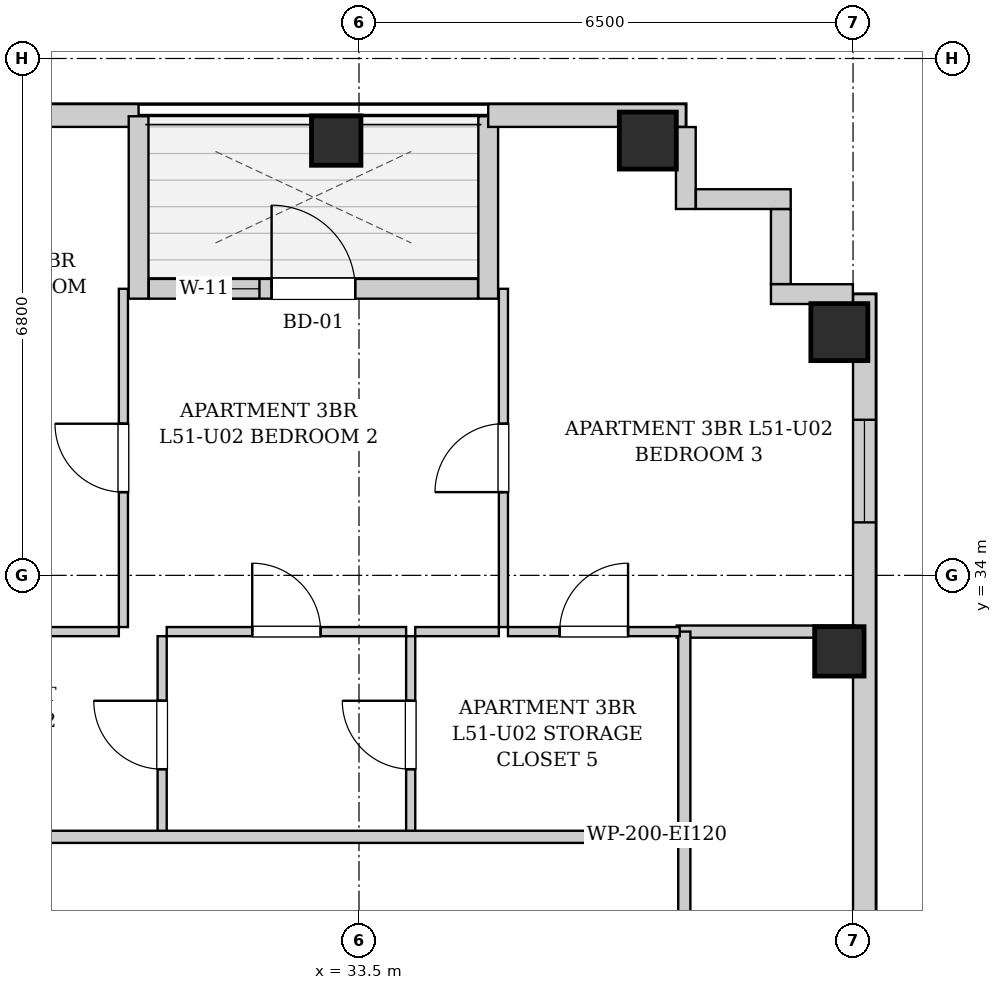
"""IFC4 building model, lengths in metres.
Left out: names, types, materials, properties, quantities, classifications, styles, units other than length and angle.
Written with IfcOpenShell. Run it as: python <this file> out.ifc"""

import sys

from ifc_helpers import new_model, si_unit, direction, frame, frame_2d, origin, origin_2d, place, context, subcontext, project, spatial, rectangle, extrude, element, fill, save


model = new_model("IFC4")
c1 = context("Model", 3, precision=1e-05, world=origin(), true_north=direction((0.0, 1.0)))
c2 = subcontext(c1, "Body", "Model", "MODEL_VIEW")
j1 = project(units=[si_unit("LENGTHUNIT", "METRE"), si_unit("PLANEANGLEUNIT", "RADIAN")], contexts=[c1])
p1 = place(None, origin())
s1 = spatial("IfcSite", under=j1, at=p1, CompositionType="ELEMENT")
p2 = place(p1, origin())
s2 = spatial("IfcBuilding", under=s1, at=p2, CompositionType="ELEMENT")
p3 = place(p2, frame((0.0, 0.0, 177.7)))
s3 = spatial("IfcBuildingStorey", under=s2, at=p3, CompositionType="ELEMENT", Elevation=177.7)
p4 = place(p3, frame((33.2, 39.72, 0.0), z_axis=(0.0, 0.0, 1.0), x_axis=(1.0, 0.0, 0.0)))
e1 = element("IfcColumn", 1, at=p4, inside=s3, PredefinedType="COLUMN", context=c2, shape_type="SweptSolid", body=[
    extrude(rectangle(XDim=0.65, YDim=0.65, at=origin_2d()), origin(), (0.0, 0.0, 1.0), 3.3),
])
p5 = place(p3, frame((37.3, 39.72, 0.0), z_axis=(0.0, 0.0, 1.0), x_axis=(1.0, 0.0, 0.0)))
e2 = element("IfcColumn", 2, at=p5, inside=s3, PredefinedType="COLUMN", context=c2, shape_type="SweptSolid", body=[
    extrude(rectangle(XDim=0.75, YDim=0.75, at=origin_2d()), origin(), (0.0, 0.0, 1.0), 3.3),
])
p6 = place(p3, frame((39.82, 33.0, 0.0), z_axis=(0.0, 0.0, 1.0), x_axis=(1.0, 0.0, 0.0)))
e3 = element("IfcColumn", 3, at=p6, inside=s3, PredefinedType="COLUMN", context=c2, shape_type="SweptSolid", body=[
    extrude(rectangle(XDim=0.65, YDim=0.65, at=origin_2d()), origin(), (0.0, 0.0, 1.0), 3.3),
])
p7 = place(p3, frame((39.82, 37.2, 0.0), z_axis=(0.0, 0.0, 1.0), x_axis=(1.0, 0.0, 0.0)))
e4 = element("IfcColumn", 4, at=p7, inside=s3, PredefinedType="COLUMN", context=c2, shape_type="SweptSolid", body=[
    extrude(rectangle(XDim=0.75, YDim=0.75, at=origin_2d()), origin(), (0.0, 0.0, 1.0), 3.3),
])
p8 = place(p3, frame((13.1, 40.05, 0.0), z_axis=(0.0, 0.0, 1.0), x_axis=(1.0, 0.0, 0.0)))
e5 = element("IfcWall", 5, at=p8, inside=s3, PredefinedType="SOLIDWALL", context=c2, shape_type="SweptSolid", body=[
    extrude(rectangle(XDim=17.5, YDim=0.3, at=frame_2d((8.75, 0.0))), origin(), (0.0, 0.0, 1.0), 3.04),
])
p9 = place(p8, frame((1.815, 0.0, 0.55)))
e6 = element("IfcOpeningElement", 6, at=p9, cuts=e5, PredefinedType="OPENING", context=c2, shape_type="SweptSolid", body=[
    extrude(rectangle(XDim=1.35, YDim=1.2, at=frame_2d((0.675, 0.6))), frame((0.0, 0.16, 0.0), z_axis=(0.0, -1.0, 0.0), x_axis=(1.0, 0.0, 0.0)), (0.0, 0.0, 1.0), 0.32),
])
p10 = place(p8, frame((6.189, 0.0, 0.55)))
e7 = element("IfcOpeningElement", 7, at=p10, cuts=e5, PredefinedType="OPENING", context=c2, shape_type="SweptSolid", body=[
    extrude(rectangle(XDim=1.35, YDim=1.2, at=frame_2d((0.675, 0.6))), frame((0.0, 0.16, 0.0), z_axis=(0.0, -1.0, 0.0), x_axis=(1.0, 0.0, 0.0)), (0.0, 0.0, 1.0), 0.32),
])
p11 = place(p8, frame((14.788, 0.0, 0.55)))
e8 = element("IfcOpeningElement", 8, at=p11, cuts=e5, PredefinedType="OPENING", context=c2, shape_type="SweptSolid", body=[
    extrude(rectangle(XDim=1.35, YDim=1.2, at=frame_2d((0.675, 0.6))), frame((0.0, 0.16, 0.0), z_axis=(0.0, -1.0, 0.0), x_axis=(1.0, 0.0, 0.0)), (0.0, 0.0, 1.0), 0.32),
])
p12 = place(p3, frame((30.6, 40.04, 0.0), z_axis=(0.0, 0.0, 1.0), x_axis=(0.0, -1.0, 0.0)))
e9 = element("IfcWall", 9, at=p12, inside=s3, PredefinedType="SOLIDWALL", context=c2, shape_type="SweptSolid", body=[
    extrude(rectangle(XDim=2.4, YDim=0.26, at=frame_2d((1.2, 0.0))), origin(), (0.0, 0.0, 1.0), 3.04),
])
p13 = place(p3, frame((30.734, 37.77, 0.0), z_axis=(0.0, 0.0, 1.0), x_axis=(1.0, 0.0, 0.0)))
e10 = element("IfcWall", 10, at=p13, inside=s3, PredefinedType="SOLIDWALL", context=c2, shape_type="SweptSolid", body=[
    extrude(rectangle(XDim=4.332, YDim=0.26, at=frame_2d((2.166, 0.0))), origin(), (0.0, 0.0, 1.0), 3.04),
])
p14 = place(p13, frame((1.616, 0.0, 0.0)))
e11 = element("IfcOpeningElement", 11, at=p14, cuts=e10, PredefinedType="OPENING", context=c2, shape_type="SweptSolid", body=[
    extrude(rectangle(XDim=1.1, YDim=2.0, at=frame_2d((0.55, 1.0))), frame((0.0, 0.14, 0.0), z_axis=(0.0, -1.0, 0.0), x_axis=(1.0, 0.0, 0.0)), (0.0, 0.0, 1.0), 0.28),
])
p15 = place(p13, frame((0.606, 0.0, 0.55)))
e12 = element("IfcOpeningElement", 12, at=p15, cuts=e10, PredefinedType="OPENING", context=c2, shape_type="SweptSolid", body=[
    extrude(rectangle(XDim=0.85, YDim=1.2, at=frame_2d((0.425, 0.6))), frame((0.0, 0.14, 0.0), z_axis=(0.0, -1.0, 0.0), x_axis=(1.0, 0.0, 0.0)), (0.0, 0.0, 1.0), 0.28),
])
p16 = place(p3, frame((35.2, 37.64, 0.0), z_axis=(0.0, 0.0, 1.0), x_axis=(0.0, 1.0, 0.0)))
e13 = element("IfcWall", 13, at=p16, inside=s3, PredefinedType="SOLIDWALL", context=c2, shape_type="SweptSolid", body=[
    extrude(rectangle(XDim=2.4, YDim=0.26, at=frame_2d((1.2, 0.0))), origin(), (0.0, 0.0, 1.0), 3.04),
])
p17 = place(p3, frame((35.2, 40.05, 0.0), z_axis=(0.0, 0.0, 1.0), x_axis=(1.0, 0.0, 0.0)))
e14 = element("IfcWall", 14, at=p17, inside=s3, PredefinedType="SOLIDWALL", context=c2, shape_type="SweptSolid", body=[
    extrude(rectangle(XDim=2.6, YDim=0.3, at=frame_2d((1.3, 0.0))), origin(), (0.0, 0.0, 1.0), 3.04),
])
p18 = place(p3, frame((40.15, 37.7, 0.0), z_axis=(0.0, 0.0, 1.0), x_axis=(0.0, -1.0, 0.0)))
e15 = element("IfcWall", 15, at=p18, inside=s3, PredefinedType="SOLIDWALL", context=c2, shape_type="SweptSolid", body=[
    extrude(rectangle(XDim=31.4, YDim=0.3, at=frame_2d((15.7, 0.0))), origin(), (0.0, 0.0, 1.0), 3.04),
])
p19 = place(p18, frame((28.396, 0.0, 0.55)))
e16 = element("IfcOpeningElement", 16, at=p19, cuts=e15, PredefinedType="OPENING", context=c2, shape_type="SweptSolid", body=[
    extrude(rectangle(XDim=1.35, YDim=1.2, at=frame_2d((0.675, 0.6))), frame((0.0, 0.16, 0.0), z_axis=(0.0, -1.0, 0.0), x_axis=(1.0, 0.0, 0.0)), (0.0, 0.0, 1.0), 0.32),
])
p20 = place(p18, frame((1.653, 0.0, 0.55)))
e17 = element("IfcOpeningElement", 17, at=p20, cuts=e15, PredefinedType="OPENING", context=c2, shape_type="SweptSolid", body=[
    extrude(rectangle(XDim=1.35, YDim=1.2, at=frame_2d((0.675, 0.6))), frame((0.0, 0.16, 0.0), z_axis=(0.0, -1.0, 0.0), x_axis=(1.0, 0.0, 0.0)), (0.0, 0.0, 1.0), 0.32),
])
p21 = place(p18, frame((19.683, 0.0, 0.55)))
e18 = element("IfcOpeningElement", 18, at=p21, cuts=e15, PredefinedType="OPENING", context=c2, shape_type="SweptSolid", body=[
    extrude(rectangle(XDim=1.35, YDim=1.2, at=frame_2d((0.675, 0.6))), frame((0.0, 0.16, 0.0), z_axis=(0.0, -1.0, 0.0), x_axis=(1.0, 0.0, 0.0)), (0.0, 0.0, 1.0), 0.32),
])
p22 = place(p18, frame((10.367, 0.0, 0.55)))
e19 = element("IfcOpeningElement", 19, at=p22, cuts=e15, PredefinedType="OPENING", context=c2, shape_type="SweptSolid", body=[
    extrude(rectangle(XDim=1.35, YDim=1.2, at=frame_2d((0.675, 0.6))), frame((0.0, 0.16, 0.0), z_axis=(0.0, -1.0, 0.0), x_axis=(1.0, 0.0, 0.0)), (0.0, 0.0, 1.0), 0.32),
])
p23 = place(p3, frame((37.8, 39.898, 0.0), z_axis=(0.0, 0.0, 1.0), x_axis=(0.0, -1.0, 0.0)))
e20 = element("IfcWall", 20, at=p23, inside=s3, PredefinedType="SOLIDWALL", context=c2, shape_type="SweptSolid", body=[
    extrude(rectangle(XDim=1.078, YDim=0.26, at=frame_2d((0.539, 0.0))), origin(), (0.0, 0.0, 1.0), 3.04),
])
p24 = place(p3, frame((37.932, 38.95, 0.0), z_axis=(0.0, 0.0, 1.0), x_axis=(1.0, 0.0, 0.0)))
e21 = element("IfcWall", 21, at=p24, inside=s3, PredefinedType="SOLIDWALL", context=c2, shape_type="SweptSolid", body=[
    extrude(rectangle(XDim=1.248, YDim=0.26, at=frame_2d((0.624, 0.0))), origin(), (0.0, 0.0, 1.0), 3.04),
])
p25 = place(p3, frame((39.05, 38.818, 0.0), z_axis=(0.0, 0.0, 1.0), x_axis=(0.0, -1.0, 0.0)))
e22 = element("IfcWall", 22, at=p25, inside=s3, PredefinedType="SOLIDWALL", context=c2, shape_type="SweptSolid", body=[
    extrude(rectangle(XDim=0.986, YDim=0.26, at=frame_2d((0.493, 0.0))), origin(), (0.0, 0.0, 1.0), 3.04),
])
p26 = place(p3, frame((38.92, 37.7, 0.0), z_axis=(0.0, 0.0, 1.0), x_axis=(1.0, 0.0, 0.0)))
e23 = element("IfcWall", 23, at=p26, inside=s3, PredefinedType="SOLIDWALL", context=c2, shape_type="SweptSolid", body=[
    extrude(rectangle(XDim=1.078, YDim=0.26, at=frame_2d((0.539, 0.0))), origin(), (0.0, 0.0, 1.0), 3.04),
])
p27 = place(p3, frame((37.78, 28.98, 0.0), z_axis=(0.0, 0.0, 1.0), x_axis=(0.0, 1.0, 0.0)))
e24 = element("IfcWall", 24, at=p27, inside=s3, PredefinedType="PARTITIONING", context=c2, shape_type="SweptSolid", body=[
    extrude(rectangle(XDim=1.58, YDim=0.16, at=frame_2d((0.79, 0.0))), origin(), (0.0, 0.0, 1.0), 3.04),
])
p28 = place(p3, frame((37.68, 33.26, 0.0), z_axis=(0.0, 0.0, 1.0), x_axis=(1.0, 0.0, 0.0)))
e25 = element("IfcWall", 25, at=p28, inside=s3, PredefinedType="PARTITIONING", context=c2, shape_type="SweptSolid", body=[
    extrude(rectangle(XDim=2.34, YDim=0.16, at=frame_2d((1.17, 0.0))), origin(), (0.0, 0.0, 1.0), 3.04),
])
p29 = place(p3, frame((37.78, 30.6, 0.0), z_axis=(0.0, 0.0, 1.0), x_axis=(0.0, 1.0, 0.0)))
e26 = element("IfcWall", 26, at=p29, inside=s3, PredefinedType="PARTITIONING", context=c2, shape_type="SweptSolid", body=[
    extrude(rectangle(XDim=2.66, YDim=0.16, at=frame_2d((1.33, 0.0))), origin(), (0.0, 0.0, 1.0), 3.04),
])
p30 = place(p3, frame((30.91, 30.6, 0.0), z_axis=(0.0, 0.0, 1.0), x_axis=(0.0, 1.0, 0.0)))
e27 = element("IfcWall", 27, at=p30, inside=s3, PredefinedType="PARTITIONING", context=c2, shape_type="SweptSolid", body=[
    extrude(rectangle(XDim=2.6, YDim=0.12, at=frame_2d((1.3, 0.0))), origin(), (0.0, 0.0, 1.0), 3.04),
])
p31 = place(p30, frame((0.85, 0.0, 0.0)))
e28 = element("IfcOpeningElement", 28, at=p31, cuts=e27, PredefinedType="OPENING", context=c2, shape_type="SweptSolid", body=[
    extrude(rectangle(XDim=0.9, YDim=2.05, at=frame_2d((0.45, 1.025))), frame((0.0, 0.07, 0.0), z_axis=(0.0, -1.0, 0.0), x_axis=(1.0, 0.0, 0.0)), (0.0, 0.0, 1.0), 0.14),
])
p32 = place(p3, frame((27.25, 33.26, 0.0), z_axis=(0.0, 0.0, 1.0), x_axis=(1.0, 0.0, 0.0)))
e29 = element("IfcWall", 29, at=p32, inside=s3, PredefinedType="PARTITIONING", context=c2, shape_type="SweptSolid", body=[
    extrude(rectangle(XDim=3.09, YDim=0.12, at=frame_2d((1.545, 0.0))), origin(), (0.0, 0.0, 1.0), 3.04),
])
p33 = place(p32, frame((1.095, 0.0, 0.0)))
e30 = element("IfcOpeningElement", 30, at=p33, cuts=e29, PredefinedType="OPENING", context=c2, shape_type="SweptSolid", body=[
    extrude(rectangle(XDim=0.9, YDim=2.05, at=frame_2d((0.45, 1.025))), frame((0.0, 0.07, 0.0), z_axis=(0.0, -1.0, 0.0), x_axis=(1.0, 0.0, 0.0)), (0.0, 0.0, 1.0), 0.14),
])
p34 = place(p3, frame((34.18, 30.6, 0.0), z_axis=(0.0, 0.0, 1.0), x_axis=(0.0, 1.0, 0.0)))
e31 = element("IfcWall", 31, at=p34, inside=s3, PredefinedType="PARTITIONING", context=c2, shape_type="SweptSolid", body=[
    extrude(rectangle(XDim=2.6, YDim=0.12, at=frame_2d((1.3, 0.0))), origin(), (0.0, 0.0, 1.0), 3.04),
])
p35 = place(p34, frame((0.85, 0.0, 0.0)))
e32 = element("IfcOpeningElement", 32, at=p35, cuts=e31, PredefinedType="OPENING", context=c2, shape_type="SweptSolid", body=[
    extrude(rectangle(XDim=0.9, YDim=2.05, at=frame_2d((0.45, 1.025))), frame((0.0, 0.07, 0.0), z_axis=(0.0, -1.0, 0.0), x_axis=(1.0, 0.0, 0.0)), (0.0, 0.0, 1.0), 0.14),
])
p36 = place(p3, frame((30.97, 33.26, 0.0), z_axis=(0.0, 0.0, 1.0), x_axis=(1.0, 0.0, 0.0)))
e33 = element("IfcWall", 33, at=p36, inside=s3, PredefinedType="PARTITIONING", context=c2, shape_type="SweptSolid", body=[
    extrude(rectangle(XDim=3.15, YDim=0.12, at=frame_2d((1.575, 0.0))), origin(), (0.0, 0.0, 1.0), 3.04),
])
p37 = place(p36, frame((1.125, 0.0, 0.0)))
e34 = element("IfcOpeningElement", 34, at=p37, cuts=e33, PredefinedType="OPENING", context=c2, shape_type="SweptSolid", body=[
    extrude(rectangle(XDim=0.9, YDim=2.05, at=frame_2d((0.45, 1.025))), frame((0.0, 0.07, 0.0), z_axis=(0.0, -1.0, 0.0), x_axis=(1.0, 0.0, 0.0)), (0.0, 0.0, 1.0), 0.14),
])
p38 = place(p3, frame((34.24, 33.26, 0.0), z_axis=(0.0, 0.0, 1.0), x_axis=(1.0, 0.0, 0.0)))
e35 = element("IfcWall", 35, at=p38, inside=s3, PredefinedType="PARTITIONING", context=c2, shape_type="SweptSolid", body=[
    extrude(rectangle(XDim=1.1, YDim=0.12, at=frame_2d((0.55, 0.0))), origin(), (0.0, 0.0, 1.0), 3.04),
])
p39 = place(p3, frame((35.46, 33.26, 0.0), z_axis=(0.0, 0.0, 1.0), x_axis=(1.0, 0.0, 0.0)))
e36 = element("IfcWall", 36, at=p39, inside=s3, PredefinedType="PARTITIONING", context=c2, shape_type="SweptSolid", body=[
    extrude(rectangle(XDim=2.26, YDim=0.12, at=frame_2d((1.13, 0.0))), origin(), (0.0, 0.0, 1.0), 3.04),
])
p40 = place(p39, frame((0.68, 0.0, 0.0)))
e37 = element("IfcOpeningElement", 37, at=p40, cuts=e36, PredefinedType="OPENING", context=c2, shape_type="SweptSolid", body=[
    extrude(rectangle(XDim=0.9, YDim=2.05, at=frame_2d((0.45, 1.025))), frame((0.0, 0.07, 0.0), z_axis=(0.0, -1.0, 0.0), x_axis=(1.0, 0.0, 0.0)), (0.0, 0.0, 1.0), 0.14),
])
p41 = place(p3, frame((30.4, 33.32, 0.0), z_axis=(0.0, 0.0, 1.0), x_axis=(0.0, 1.0, 0.0)))
e38 = element("IfcWall", 38, at=p41, inside=s3, PredefinedType="PARTITIONING", context=c2, shape_type="SweptSolid", body=[
    extrude(rectangle(XDim=4.45, YDim=0.12, at=frame_2d((2.225, 0.0))), origin(), (0.0, 0.0, 1.0), 3.04),
])
p42 = place(p41, frame((1.775, 0.0, 0.0)))
e39 = element("IfcOpeningElement", 39, at=p42, cuts=e38, PredefinedType="OPENING", context=c2, shape_type="SweptSolid", body=[
    extrude(rectangle(XDim=0.9, YDim=2.05, at=frame_2d((0.45, 1.025))), frame((0.0, 0.07, 0.0), z_axis=(0.0, -1.0, 0.0), x_axis=(1.0, 0.0, 0.0)), (0.0, 0.0, 1.0), 0.14),
])
p43 = place(p3, frame((35.4, 33.32, 0.0), z_axis=(0.0, 0.0, 1.0), x_axis=(0.0, 1.0, 0.0)))
e40 = element("IfcWall", 40, at=p43, inside=s3, PredefinedType="PARTITIONING", context=c2, shape_type="SweptSolid", body=[
    extrude(rectangle(XDim=4.45, YDim=0.12, at=frame_2d((2.225, 0.0))), origin(), (0.0, 0.0, 1.0), 3.04),
])
p44 = place(p43, frame((1.775, 0.0, 0.0)))
e41 = element("IfcOpeningElement", 41, at=p44, cuts=e40, PredefinedType="OPENING", context=c2, shape_type="SweptSolid", body=[
    extrude(rectangle(XDim=0.9, YDim=2.05, at=frame_2d((0.45, 1.025))), frame((0.0, 0.07, 0.0), z_axis=(0.0, -1.0, 0.0), x_axis=(1.0, 0.0, 0.0)), (0.0, 0.0, 1.0), 0.14),
])
p45 = place(p3, frame((13.15, 30.56, 0.0), z_axis=(0.0, 0.0, 1.0), x_axis=(1.0, 0.0, 0.0)))
e42 = element("IfcWall", 42, at=p45, inside=s3, PredefinedType="PARTITIONING", context=c2, shape_type="SweptSolid", body=[
    extrude(rectangle(XDim=24.6, YDim=0.16, at=frame_2d((12.3, 0.0))), origin(), (0.0, 0.0, 1.0), 3.04),
])
p46 = place(p45, frame((5.235, 0.0, 0.0)))
e43 = element("IfcOpeningElement", 43, at=p46, cuts=e42, PredefinedType="OPENING", context=c2, shape_type="SweptSolid", body=[
    extrude(rectangle(XDim=0.95, YDim=2.1, at=frame_2d((0.475, 1.05))), frame((0.0, 0.09, 0.0), z_axis=(0.0, -1.0, 0.0), x_axis=(1.0, 0.0, 0.0)), (0.0, 0.0, 1.0), 0.18),
])
p47 = place(p31, origin())
e44 = element("IfcDoor", 44, at=p47, inside=s3, OperationType="SINGLE_SWING_RIGHT", PredefinedType="DOOR", context=c2, shape_type="SweptSolid", body=[
    extrude(rectangle(XDim=0.9, YDim=2.05, at=frame_2d((0.45, 1.025))), frame((0.0, 0.025, 0.0), z_axis=(0.0, -1.0, 0.0), x_axis=(1.0, 0.0, 0.0)), (0.0, 0.0, 1.0), 0.05),
])
fill(e28, e44)
p48 = place(p35, origin())
e45 = element("IfcDoor", 45, at=p48, inside=s3, OperationType="SINGLE_SWING_RIGHT", PredefinedType="DOOR", context=c2, shape_type="SweptSolid", body=[
    extrude(rectangle(XDim=0.9, YDim=2.05, at=frame_2d((0.45, 1.025))), frame((0.0, 0.025, 0.0), z_axis=(0.0, -1.0, 0.0), x_axis=(1.0, 0.0, 0.0)), (0.0, 0.0, 1.0), 0.05),
])
fill(e32, e45)
p49 = place(p37, origin())
e46 = element("IfcDoor", 46, at=p49, inside=s3, OperationType="SINGLE_SWING_LEFT", PredefinedType="DOOR", context=c2, shape_type="SweptSolid", body=[
    extrude(rectangle(XDim=0.9, YDim=2.05, at=frame_2d((0.45, 1.025))), frame((0.0, 0.025, 0.0), z_axis=(0.0, -1.0, 0.0), x_axis=(1.0, 0.0, 0.0)), (0.0, 0.0, 1.0), 0.05),
])
fill(e34, e46)
p50 = place(p40, origin())
e47 = element("IfcDoor", 47, at=p50, inside=s3, OperationType="SINGLE_SWING_RIGHT", PredefinedType="DOOR", context=c2, shape_type="SweptSolid", body=[
    extrude(rectangle(XDim=0.9, YDim=2.05, at=frame_2d((0.45, 1.025))), frame((0.0, 0.025, 0.0), z_axis=(0.0, -1.0, 0.0), x_axis=(1.0, 0.0, 0.0)), (0.0, 0.0, 1.0), 0.05),
])
fill(e37, e47)
p51 = place(p42, origin())
e48 = element("IfcDoor", 48, at=p51, inside=s3, OperationType="SINGLE_SWING_RIGHT", PredefinedType="DOOR", context=c2, shape_type="SweptSolid", body=[
    extrude(rectangle(XDim=0.9, YDim=2.05, at=frame_2d((0.45, 1.025))), frame((0.0, 0.025, 0.0), z_axis=(0.0, -1.0, 0.0), x_axis=(1.0, 0.0, 0.0)), (0.0, 0.0, 1.0), 0.05),
])
fill(e39, e48)
p52 = place(p44, origin())
e49 = element("IfcDoor", 49, at=p52, inside=s3, OperationType="SINGLE_SWING_LEFT", PredefinedType="DOOR", context=c2, shape_type="SweptSolid", body=[
    extrude(rectangle(XDim=0.9, YDim=2.05, at=frame_2d((0.45, 1.025))), frame((0.0, 0.025, 0.0), z_axis=(0.0, -1.0, 0.0), x_axis=(1.0, 0.0, 0.0)), (0.0, 0.0, 1.0), 0.05),
])
fill(e41, e49)
p53 = place(p14, origin())
e50 = element("IfcDoor", 50, at=p53, inside=s3, OperationType="SINGLE_SWING_LEFT", PredefinedType="DOOR", context=c2, shape_type="SweptSolid", body=[
    extrude(rectangle(XDim=1.1, YDim=2.0, at=frame_2d((0.55, 1.0))), frame((0.0, 0.025, 0.0), z_axis=(0.0, -1.0, 0.0), x_axis=(1.0, 0.0, 0.0)), (0.0, 0.0, 1.0), 0.05),
])
fill(e11, e50)
p54 = place(p15, origin())
e51 = element("IfcWindow", 51, at=p54, inside=s3, PartitioningType="SINGLE_PANEL", PredefinedType="WINDOW", context=c2, shape_type="SweptSolid", body=[
    extrude(rectangle(XDim=0.85, YDim=1.2, at=frame_2d((0.425, 0.6))), frame((0.0, 0.03, 0.0), z_axis=(0.0, -1.0, 0.0), x_axis=(1.0, 0.0, 0.0)), (0.0, 0.0, 1.0), 0.06),
])
fill(e12, e51)
p55 = place(p20, origin())
e52 = element("IfcWindow", 52, at=p55, inside=s3, PartitioningType="SINGLE_PANEL", PredefinedType="WINDOW", context=c2, shape_type="SweptSolid", body=[
    extrude(rectangle(XDim=1.35, YDim=1.2, at=frame_2d((0.675, 0.6))), frame((0.0, 0.03, 0.0), z_axis=(0.0, -1.0, 0.0), x_axis=(1.0, 0.0, 0.0)), (0.0, 0.0, 1.0), 0.06),
])
fill(e17, e52)
save(model, sys.argv[1])
